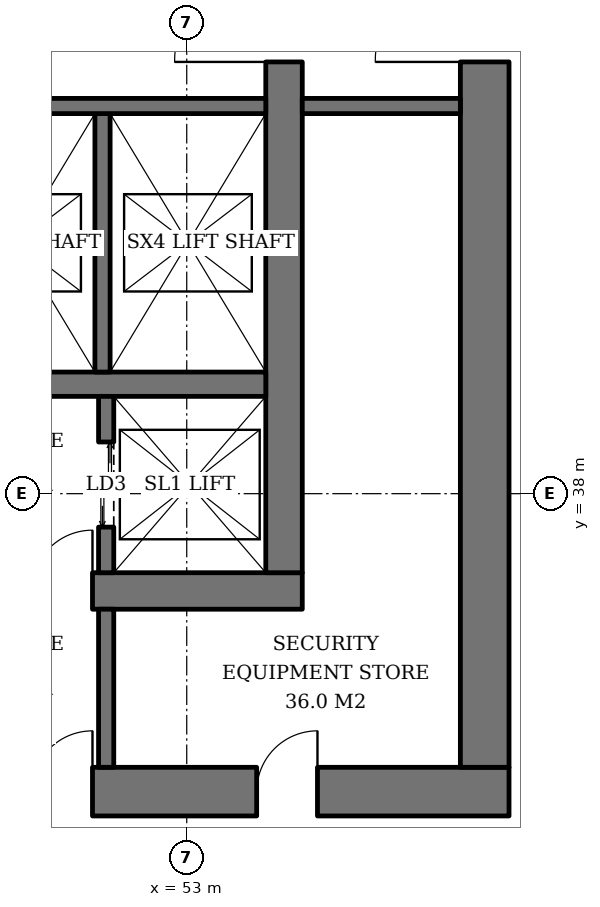
"""IFC4 building model, lengths in metres.
Left out: names, types, materials, properties, quantities, classifications, styles, units other than length and angle.
Written with IfcOpenShell. Run it as: python <this file> out.ifc"""

import sys

from ifc_helpers import new_model, si_unit, direction, frame, frame_2d, origin, place, context, subcontext, project, spatial, rectangle, extrude, element, fill, save


model = new_model("IFC4")
c1 = context("Model", 3, precision=1e-05, world=origin(), true_north=direction((0.0, 1.0)))
c2 = subcontext(c1, "Body", "Model", "MODEL_VIEW")
j1 = project(units=[si_unit("LENGTHUNIT", "METRE"), si_unit("PLANEANGLEUNIT", "RADIAN")], contexts=[c1])
p1 = place(None, origin())
s1 = spatial("IfcSite", under=j1, at=p1, CompositionType="ELEMENT")
p2 = place(p1, origin())
s2 = spatial("IfcBuilding", under=s1, at=p2, CompositionType="ELEMENT")
p3 = place(p2, frame((0.0, 0.0, 16.0)))
s3 = spatial("IfcBuildingStorey", under=s2, at=p3, CompositionType="ELEMENT", Elevation=16.0)
p4 = place(p3, frame((35.1, 36.4, 0.0), z_axis=(0.0, 0.0, 1.0), x_axis=(1.0, 0.0, 0.0)))
e1 = element("IfcWall", 1, at=p4, inside=s3, PredefinedType="SHEAR", context=c2, shape_type="SweptSolid", body=[
    extrude(rectangle(XDim=19.8, YDim=0.6, at=frame_2d((9.9, 0.0))), origin(), (0.0, 0.0, 1.0), 5.0),
])
p5 = place(p4, frame((3.9, 0.0, 0.0)))
e2 = element("IfcOpeningElement", 2, at=p5, cuts=e1, PredefinedType="OPENING", context=c2, shape_type="SweptSolid", body=[
    extrude(rectangle(XDim=1.0, YDim=2.1, at=frame_2d((0.5, 1.05))), frame((0.0, 0.31, 0.0), z_axis=(0.0, -1.0, 0.0), x_axis=(1.0, 0.0, 0.0)), (0.0, 0.0, 1.0), 0.62),
])
p6 = place(p4, frame((15.35, 0.0, 0.0)))
e3 = element("IfcOpeningElement", 3, at=p6, cuts=e1, PredefinedType="OPENING", context=c2, shape_type="SweptSolid", body=[
    extrude(rectangle(XDim=1.0, YDim=2.1, at=frame_2d((0.5, 1.05))), frame((0.0, 0.31, 0.0), z_axis=(0.0, -1.0, 0.0), x_axis=(1.0, 0.0, 0.0)), (0.0, 0.0, 1.0), 0.62),
])
p7 = place(p3, frame((54.6, 36.7, 0.0), z_axis=(0.0, 0.0, 1.0), x_axis=(0.0, 1.0, 0.0)))
e4 = element("IfcWall", 4, at=p7, inside=s3, PredefinedType="SHEAR", context=c2, shape_type="SweptSolid", body=[
    extrude(rectangle(XDim=18.6, YDim=0.6, at=frame_2d((9.3, 0.0))), origin(), (0.0, 0.0, 1.0), 5.0),
])
p8 = place(p7, frame((8.4, 0.0, 0.0)))
e5 = element("IfcOpeningElement", 5, at=p8, cuts=e4, PredefinedType="OPENING", context=c2, shape_type="SweptSolid", body=[
    extrude(rectangle(XDim=1.8, YDim=2.4, at=frame_2d((0.9, 1.2))), frame((0.0, 0.31, 0.0), z_axis=(0.0, -1.0, 0.0), x_axis=(1.0, 0.0, 0.0)), (0.0, 0.0, 1.0), 0.62),
])
p9 = place(p3, frame((31.7, 33.1, 0.0), z_axis=(0.0, 0.0, 1.0), x_axis=(1.0, 0.0, 0.0)))
e6 = element("IfcWall", 6, at=p9, inside=s3, PredefinedType="SHEAR", context=c2, shape_type="SweptSolid", body=[
    extrude(rectangle(XDim=26.6, YDim=0.8, at=frame_2d((13.3, 0.0))), origin(), (0.0, 0.0, 1.0), 5.0),
])
p10 = place(p9, frame((7.3, 0.0, 0.0)))
e7 = element("IfcOpeningElement", 7, at=p10, cuts=e6, PredefinedType="OPENING", context=c2, shape_type="SweptSolid", body=[
    extrude(rectangle(XDim=1.0, YDim=2.1, at=frame_2d((0.5, 1.05))), frame((0.0, 0.41, 0.0), z_axis=(0.0, -1.0, 0.0), x_axis=(1.0, 0.0, 0.0)), (0.0, 0.0, 1.0), 0.82),
])
p11 = place(p9, frame((18.75, 0.0, 0.0)))
e8 = element("IfcOpeningElement", 8, at=p11, cuts=e6, PredefinedType="OPENING", context=c2, shape_type="SweptSolid", body=[
    extrude(rectangle(XDim=1.0, YDim=2.1, at=frame_2d((0.5, 1.05))), frame((0.0, 0.41, 0.0), z_axis=(0.0, -1.0, 0.0), x_axis=(1.0, 0.0, 0.0)), (0.0, 0.0, 1.0), 0.82),
])
p12 = place(p9, frame((3.25, 0.0, 0.0)))
e9 = element("IfcOpeningElement", 9, at=p12, cuts=e6, PredefinedType="OPENING", context=c2, shape_type="SweptSolid", body=[
    extrude(rectangle(XDim=1.0, YDim=2.1, at=frame_2d((0.5, 1.05))), frame((0.0, 0.41, 0.0), z_axis=(0.0, -1.0, 0.0), x_axis=(1.0, 0.0, 0.0)), (0.0, 0.0, 1.0), 0.82),
])
p13 = place(p9, frame((10.42, 0.0, 0.0)))
e10 = element("IfcOpeningElement", 10, at=p13, cuts=e6, PredefinedType="OPENING", context=c2, shape_type="SweptSolid", body=[
    extrude(rectangle(XDim=1.0, YDim=2.1, at=frame_2d((0.5, 1.05))), frame((0.0, 0.41, 0.0), z_axis=(0.0, -1.0, 0.0), x_axis=(1.0, 0.0, 0.0)), (0.0, 0.0, 1.0), 0.82),
])
p14 = place(p9, frame((14.46, 0.0, 0.0)))
e11 = element("IfcOpeningElement", 11, at=p14, cuts=e6, PredefinedType="OPENING", context=c2, shape_type="SweptSolid", body=[
    extrude(rectangle(XDim=1.0, YDim=2.1, at=frame_2d((0.5, 1.05))), frame((0.0, 0.41, 0.0), z_axis=(0.0, -1.0, 0.0), x_axis=(1.0, 0.0, 0.0)), (0.0, 0.0, 1.0), 0.82),
])
p15 = place(p9, frame((22.45, 0.0, 0.0)))
e12 = element("IfcOpeningElement", 12, at=p15, cuts=e6, PredefinedType="OPENING", context=c2, shape_type="SweptSolid", body=[
    extrude(rectangle(XDim=1.0, YDim=2.1, at=frame_2d((0.5, 1.05))), frame((0.0, 0.41, 0.0), z_axis=(0.0, -1.0, 0.0), x_axis=(1.0, 0.0, 0.0)), (0.0, 0.0, 1.0), 0.82),
])
p16 = place(p3, frame((57.9, 33.5, 0.0), z_axis=(0.0, 0.0, 1.0), x_axis=(0.0, 1.0, 0.0)))
e13 = element("IfcWall", 13, at=p16, inside=s3, PredefinedType="SHEAR", context=c2, shape_type="SweptSolid", body=[
    extrude(rectangle(XDim=25.0, YDim=0.8, at=frame_2d((12.5, 0.0))), origin(), (0.0, 0.0, 1.0), 5.0),
])
p17 = place(p16, frame((11.6, 0.0, 0.0)))
e14 = element("IfcOpeningElement", 14, at=p17, cuts=e13, PredefinedType="OPENING", context=c2, shape_type="SweptSolid", body=[
    extrude(rectangle(XDim=1.8, YDim=2.4, at=frame_2d((0.9, 1.2))), frame((0.0, 0.41, 0.0), z_axis=(0.0, -1.0, 0.0), x_axis=(1.0, 0.0, 0.0)), (0.0, 0.0, 1.0), 0.82),
])
p18 = place(p3, frame((35.7, 39.8, 0.0), z_axis=(0.0, 0.0, 1.0), x_axis=(1.0, 0.0, 0.0)))
e15 = element("IfcWall", 15, at=p18, inside=s3, PredefinedType="SHEAR", context=c2, shape_type="SweptSolid", body=[
    extrude(rectangle(XDim=18.6, YDim=0.4, at=frame_2d((9.3, 0.0))), origin(), (0.0, 0.0, 1.0), 5.0),
])
p19 = place(p3, frame((51.675, 36.7, 0.0), z_axis=(0.0, 0.0, 1.0), x_axis=(0.0, 1.0, 0.0)))
e16 = element("IfcWall", 16, at=p19, inside=s3, PredefinedType="SHEAR", context=c2, shape_type="SweptSolid", body=[
    extrude(rectangle(XDim=2.9, YDim=0.25, at=frame_2d((1.45, 0.0))), origin(), (0.0, 0.0, 1.0), 5.0),
])
p20 = place(p19, frame((0.75, 0.0, 0.0)))
e17 = element("IfcOpeningElement", 17, at=p20, cuts=e16, PredefinedType="OPENING", context=c2, shape_type="SweptSolid", body=[
    extrude(rectangle(XDim=1.4, YDim=2.4, at=frame_2d((0.7, 1.2))), frame((0.0, 0.135, 0.0), z_axis=(0.0, -1.0, 0.0), x_axis=(1.0, 0.0, 0.0)), (0.0, 0.0, 1.0), 0.27),
])
p21 = place(p3, frame((51.615, 44.25, 0.0), z_axis=(0.0, 0.0, 1.0), x_axis=(0.0, -1.0, 0.0)))
e18 = element("IfcWall", 18, at=p21, inside=s3, PredefinedType="SHEAR", context=c2, shape_type="SweptSolid", body=[
    extrude(rectangle(XDim=4.25, YDim=0.25, at=frame_2d((2.125, 0.0))), origin(), (0.0, 0.0, 1.0), 5.0),
])
p22 = place(p3, frame((48.93, 44.375, 0.0), z_axis=(0.0, 0.0, 1.0), x_axis=(1.0, 0.0, 0.0)))
e19 = element("IfcWall", 19, at=p22, inside=s3, PredefinedType="SHEAR", context=c2, shape_type="SweptSolid", body=[
    extrude(rectangle(XDim=5.37, YDim=0.25, at=frame_2d((2.685, 0.0))), origin(), (0.0, 0.0, 1.0), 5.0),
])
for number, where, z_axis, x_axis in (
    (20, (54.9, 44.375, 0.0), (0.0, 0.0, 1.0), (1.0, 0.0, 0.0)),
    (21, (51.675, 33.5, 0.0), (0.0, 0.0, 1.0), (0.0, 1.0, 0.0)),
):
    element("IfcWall", number, at=place(p3, frame(where, z_axis=z_axis, x_axis=x_axis)), inside=s3, PredefinedType="SOLIDWALL", context=c2, shape_type="SweptSolid", body=[
        extrude(rectangle(XDim=2.6, YDim=0.25, at=frame_2d((1.3, 0.0))), origin(), (0.0, 0.0, 1.0), 4.7),
    ])
p23 = place(p20, origin())
e22 = element("IfcDoor", 22, at=p23, inside=s3, OperationType="DOUBLE_DOOR_SLIDING", PredefinedType="DOOR", context=c2, shape_type="SweptSolid", body=[
    extrude(rectangle(XDim=1.4, YDim=2.4, at=frame_2d((0.7, 1.2))), frame((0.0, 0.025, 0.0), z_axis=(0.0, -1.0, 0.0), x_axis=(1.0, 0.0, 0.0)), (0.0, 0.0, 1.0), 0.05),
])
fill(e17, e22)
p24 = place(p8, origin())
e23 = element("IfcDoor", 23, at=p24, inside=s3, OperationType="DOUBLE_DOOR_SINGLE_SWING", PredefinedType="DOOR", context=c2, shape_type="SweptSolid", body=[
    extrude(rectangle(XDim=1.8, YDim=2.4, at=frame_2d((0.9, 1.2))), frame((0.0, 0.025, 0.0), z_axis=(0.0, -1.0, 0.0), x_axis=(1.0, 0.0, 0.0)), (0.0, 0.0, 1.0), 0.05),
])
fill(e5, e23)
p25 = place(p6, origin())
e24 = element("IfcDoor", 24, at=p25, inside=s3, OperationType="SINGLE_SWING_RIGHT", PredefinedType="DOOR", context=c2, shape_type="SweptSolid", body=[
    extrude(rectangle(XDim=1.0, YDim=2.1, at=frame_2d((0.5, 1.05))), frame((0.0, 0.025, 0.0), z_axis=(0.0, -1.0, 0.0), x_axis=(1.0, 0.0, 0.0)), (0.0, 0.0, 1.0), 0.05),
])
fill(e3, e24)
p26 = place(p17, origin())
e25 = element("IfcDoor", 25, at=p26, inside=s3, OperationType="DOUBLE_DOOR_SINGLE_SWING", PredefinedType="DOOR", context=c2, shape_type="SweptSolid", body=[
    extrude(rectangle(XDim=1.8, YDim=2.4, at=frame_2d((0.9, 1.2))), frame((0.0, 0.025, 0.0), z_axis=(0.0, -1.0, 0.0), x_axis=(1.0, 0.0, 0.0)), (0.0, 0.0, 1.0), 0.05),
])
fill(e14, e25)
p27 = place(p11, origin())
e26 = element("IfcDoor", 26, at=p27, inside=s3, OperationType="SINGLE_SWING_RIGHT", PredefinedType="DOOR", context=c2, shape_type="SweptSolid", body=[
    extrude(rectangle(XDim=1.0, YDim=2.1, at=frame_2d((0.5, 1.05))), frame((0.0, 0.025, 0.0), z_axis=(0.0, -1.0, 0.0), x_axis=(1.0, 0.0, 0.0)), (0.0, 0.0, 1.0), 0.05),
])
fill(e8, e26)
p28 = place(p15, origin())
e27 = element("IfcDoor", 27, at=p28, inside=s3, OperationType="SINGLE_SWING_RIGHT", PredefinedType="DOOR", context=c2, shape_type="SweptSolid", body=[
    extrude(rectangle(XDim=1.0, YDim=2.1, at=frame_2d((0.5, 1.05))), frame((0.0, 0.39, 0.0), z_axis=(0.0, -1.0, 0.0), x_axis=(1.0, 0.0, 0.0)), (0.0, 0.0, 1.0), 0.05),
])
fill(e12, e27)
save(model, sys.argv[1])
